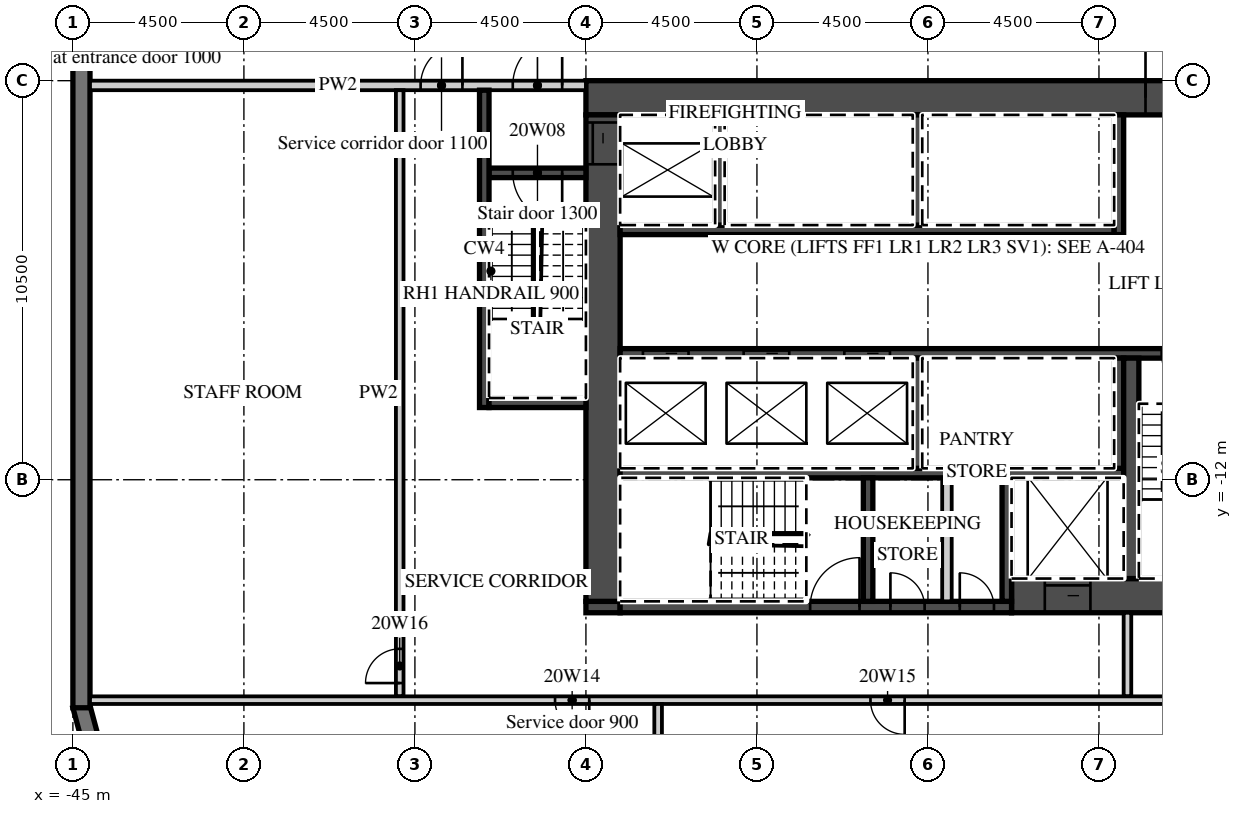
"""IFC4 building model, lengths in metres.
Left out: names, types, materials, properties, quantities, classifications, styles, units other than length and angle.
Written with IfcOpenShell. Run it as: python <this file> out.ifc"""

import sys

from ifc_helpers import new_model, si_unit, direction, frame, frame_2d, origin, place, context, subcontext, project, spatial, polyline, rectangle, outline, extrude, element, fill, save


model = new_model("IFC4")
c1 = context("Model", 3, precision=1e-05, world=origin(), true_north=direction((0.0, 1.0)))
c2 = subcontext(c1, "Body", "Model", "MODEL_VIEW")
j1 = project(units=[si_unit("LENGTHUNIT", "METRE"), si_unit("PLANEANGLEUNIT", "RADIAN")], contexts=[c1])
p1 = place(None, origin())
s1 = spatial("IfcSite", under=j1, at=p1, CompositionType="ELEMENT")
p2 = place(p1, origin())
s2 = spatial("IfcBuilding", under=s1, at=p2, CompositionType="ELEMENT")
p3 = place(p2, frame((0.0, 0.0, 96.3)))
s3 = spatial("IfcBuildingStorey", under=s2, at=p3, CompositionType="ELEMENT", Elevation=96.3)
p4 = place(p3, frame((-44.783, -17.942, 0.0), z_axis=(0.0, 0.0, 1.0), x_axis=(0.25881466832, -0.965926999034, 0.0)))
e1 = element("IfcWall", 1, at=p4, inside=s3, PredefinedType="SOLIDWALL", context=c2, shape_type="SweptSolid", body=[
    extrude(outline(polyline([(0.0, -0.225), (2.071, -0.225), (1.95, 0.225), (0.121, 0.225), (0.0, -0.225)])), origin(), (0.0, 0.0, 1.0), 3.0),
])
p5 = place(p3, frame((-44.775, 18.0, 0.0), z_axis=(0.0, 0.0, 1.0), x_axis=(0.0, -1.0, 0.0)))
e2 = element("IfcWall", 2, at=p5, inside=s3, PredefinedType="SOLIDWALL", context=c2, shape_type="SweptSolid", body=[
    extrude(rectangle(XDim=36.0, YDim=0.45, at=frame_2d((18.0, 0.0))), origin(), (0.0, 0.0, 1.0), 3.0),
])
p6 = place(p5, frame((3.9, 0.0, 0.45)))
e3 = element("IfcOpeningElement", 3, at=p6, cuts=e2, PredefinedType="OPENING", context=c2, shape_type="SweptSolid", body=[
    extrude(rectangle(XDim=3.3, YDim=2.25, at=frame_2d((1.65, 1.125))), frame((0.0, 0.235, 0.0), z_axis=(0.0, -1.0, 0.0), x_axis=(1.0, 0.0, 0.0)), (0.0, 0.0, 1.0), 0.47),
])
p7 = place(p5, frame((8.4, 0.0, 0.45)))
e4 = element("IfcOpeningElement", 4, at=p7, cuts=e2, PredefinedType="OPENING", context=c2, shape_type="SweptSolid", body=[
    extrude(rectangle(XDim=3.3, YDim=2.25, at=frame_2d((1.65, 1.125))), frame((0.0, 0.235, 0.0), z_axis=(0.0, -1.0, 0.0), x_axis=(1.0, 0.0, 0.0)), (0.0, 0.0, 1.0), 0.47),
])
p8 = place(p5, frame((12.9, 0.0, 0.45)))
e5 = element("IfcOpeningElement", 5, at=p8, cuts=e2, PredefinedType="OPENING", context=c2, shape_type="SweptSolid", body=[
    extrude(rectangle(XDim=3.3, YDim=2.25, at=frame_2d((1.65, 1.125))), frame((0.0, 0.235, 0.0), z_axis=(0.0, -1.0, 0.0), x_axis=(1.0, 0.0, 0.0)), (0.0, 0.0, 1.0), 0.47),
])
p9 = place(p3, frame((-31.5, -1.95, 0.0), z_axis=(0.0, 0.0, 1.0), x_axis=(1.0, 0.0, 0.0)))
e6 = element("IfcWall", 6, at=p9, inside=s3, PredefinedType="SHEAR", context=c2, shape_type="SweptSolid", body=[
    extrude(rectangle(XDim=18.0, YDim=0.9, at=frame_2d((9.0, 0.0))), origin(), (0.0, 0.0, 1.0), 3.0),
])
p10 = place(p9, frame((14.725, 0.0, 0.0)))
e7 = element("IfcOpeningElement", 7, at=p10, cuts=e6, PredefinedType="OPENING", context=c2, shape_type="SweptSolid", body=[
    extrude(rectangle(XDim=1.8, YDim=2.1, at=frame_2d((0.9, 1.05))), frame((0.0, 0.46, 0.0), z_axis=(0.0, -1.0, 0.0), x_axis=(1.0, 0.0, 0.0)), (0.0, 0.0, 1.0), 0.92),
])
p11 = place(p3, frame((-20.3, -15.05, 0.0), z_axis=(0.0, 0.0, 1.0), x_axis=(1.0, 0.0, 0.0)))
e8 = element("IfcWall", 8, at=p11, inside=s3, PredefinedType="SHEAR", context=c2, shape_type="SweptSolid", body=[
    extrude(rectangle(XDim=6.8, YDim=0.9, at=frame_2d((3.4, 0.0))), origin(), (0.0, 0.0, 1.0), 3.0),
])
p12 = place(p11, frame((0.875, 0.0, 0.0)))
e9 = element("IfcOpeningElement", 9, at=p12, cuts=e8, PredefinedType="OPENING", context=c2, shape_type="SweptSolid", body=[
    extrude(rectangle(XDim=1.2, YDim=2.1, at=frame_2d((0.6, 1.05))), frame((0.0, 0.46, 0.0), z_axis=(0.0, -1.0, 0.0), x_axis=(1.0, 0.0, 0.0)), (0.0, 0.0, 1.0), 0.92),
])
p13 = place(p3, frame((-31.5, -15.35, 0.0), z_axis=(0.0, 0.0, 1.0), x_axis=(1.0, 0.0, 0.0)))
e10 = element("IfcWall", 10, at=p13, inside=s3, PredefinedType="SHEAR", context=c2, shape_type="SweptSolid", body=[
    extrude(rectangle(XDim=0.9, YDim=0.3, at=frame_2d((0.45, 0.0))), origin(), (0.0, 0.0, 1.0), 3.0),
])
p14 = place(p3, frame((-30.6, -15.35, 0.0), z_axis=(0.0, 0.0, 1.0), x_axis=(1.0, 0.0, 0.0)))
e11 = element("IfcWall", 11, at=p14, inside=s3, PredefinedType="SHEAR", context=c2, shape_type="SweptSolid", body=[
    extrude(rectangle(XDim=10.3, YDim=0.3, at=frame_2d((5.15, 0.0))), origin(), (0.0, 0.0, 1.0), 3.0),
])
p15 = place(p14, frame((5.0, 0.0, 0.0)))
e12 = element("IfcOpeningElement", 12, at=p15, cuts=e11, PredefinedType="OPENING", context=c2, shape_type="SweptSolid", body=[
    extrude(rectangle(XDim=1.3, YDim=2.1, at=frame_2d((0.65, 1.05))), frame((0.0, 0.16, 0.0), z_axis=(0.0, -1.0, 0.0), x_axis=(1.0, 0.0, 0.0)), (0.0, 0.0, 1.0), 0.32),
])
p16 = place(p14, frame((7.113, 0.0, 0.0)))
e13 = element("IfcOpeningElement", 13, at=p16, cuts=e11, PredefinedType="OPENING", context=c2, shape_type="SweptSolid", body=[
    extrude(rectangle(XDim=0.9, YDim=2.1, at=frame_2d((0.45, 1.05))), frame((0.0, 0.16, 0.0), z_axis=(0.0, -1.0, 0.0), x_axis=(1.0, 0.0, 0.0)), (0.0, 0.0, 1.0), 0.32),
])
p17 = place(p14, frame((8.938, 0.0, 0.0)))
e14 = element("IfcOpeningElement", 14, at=p17, cuts=e11, PredefinedType="OPENING", context=c2, shape_type="SweptSolid", body=[
    extrude(rectangle(XDim=0.9, YDim=2.1, at=frame_2d((0.45, 1.05))), frame((0.0, 0.16, 0.0), z_axis=(0.0, -1.0, 0.0), x_axis=(1.0, 0.0, 0.0)), (0.0, 0.0, 1.0), 0.32),
])
p18 = place(p3, frame((-31.05, -15.2, 0.0), z_axis=(0.0, 0.0, 1.0), x_axis=(0.0, 1.0, 0.0)))
e15 = element("IfcWall", 15, at=p18, inside=s3, PredefinedType="SHEAR", context=c2, shape_type="SweptSolid", body=[
    extrude(rectangle(XDim=12.8, YDim=0.9, at=frame_2d((6.4, 0.0))), origin(), (0.0, 0.0, 1.0), 3.0),
])
p19 = place(p18, frame((11.5, 0.0, 0.0)))
e16 = element("IfcOpeningElement", 16, at=p19, cuts=e15, PredefinedType="OPENING", context=c2, shape_type="SweptSolid", body=[
    extrude(rectangle(XDim=1.1, YDim=2.1, at=frame_2d((0.55, 1.05))), frame((0.0, 0.46, 0.0), z_axis=(0.0, -1.0, 0.0), x_axis=(1.0, 0.0, 0.0)), (0.0, 0.0, 1.0), 0.92),
])
p20 = place(p3, frame((-30.6, -5.425, 0.0), z_axis=(0.0, 0.0, 1.0), x_axis=(1.0, 0.0, 0.0)))
e17 = element("IfcWall", 17, at=p20, inside=s3, PredefinedType="SHEAR", context=c2, shape_type="SweptSolid", body=[
    extrude(rectangle(XDim=13.0, YDim=0.25, at=frame_2d((6.5, 0.0))), origin(), (0.0, 0.0, 1.0), 3.0),
])
p21 = place(p3, frame((-17.475, -5.55, 0.0), z_axis=(0.0, 0.0, 1.0), x_axis=(0.0, 1.0, 0.0)))
e18 = element("IfcWall", 18, at=p21, inside=s3, PredefinedType="SHEAR", context=c2, shape_type="SweptSolid", body=[
    extrude(rectangle(XDim=3.15, YDim=0.25, at=frame_2d((1.575, 0.0))), origin(), (0.0, 0.0, 1.0), 3.0),
])
for number, where, z_axis, x_axis in (
    (19, (-27.975, -5.3, 0.0), (0.0, 0.0, 1.0), (0.0, 1.0, 0.0)),
    (20, (-22.775, -5.3, 0.0), (0.0, 0.0, 1.0), (0.0, 1.0, 0.0)),
):
    element("IfcWall", number, at=place(p3, frame(where, z_axis=z_axis, x_axis=x_axis)), inside=s3, PredefinedType="SHEAR", context=c2, shape_type="SweptSolid", body=[
        extrude(rectangle(XDim=2.9, YDim=0.25, at=frame_2d((1.45, 0.0))), origin(), (0.0, 0.0, 1.0), 3.0),
    ])
p22 = place(p3, frame((-30.6, -8.675, 0.0), z_axis=(0.0, 0.0, 1.0), x_axis=(1.0, 0.0, 0.0)))
e21 = element("IfcWall", 21, at=p22, inside=s3, PredefinedType="SHEAR", context=c2, shape_type="SweptSolid", body=[
    extrude(rectangle(XDim=16.2, YDim=0.25, at=frame_2d((8.1, 0.0))), origin(), (0.0, 0.0, 1.0), 3.0),
])
p23 = place(p22, frame((0.6, 0.0, 0.0)))
e22 = element("IfcOpeningElement", 22, at=p23, cuts=e21, PredefinedType="OPENING", context=c2, shape_type="SweptSolid", body=[
    extrude(rectangle(XDim=1.2, YDim=2.1, at=frame_2d((0.6, 1.05))), frame((0.0, 0.135, 0.0), z_axis=(0.0, -1.0, 0.0), x_axis=(1.0, 0.0, 0.0)), (0.0, 0.0, 1.0), 0.27),
])
p24 = place(p22, frame((3.25, 0.0, 0.0)))
e23 = element("IfcOpeningElement", 23, at=p24, cuts=e21, PredefinedType="OPENING", context=c2, shape_type="SweptSolid", body=[
    extrude(rectangle(XDim=1.2, YDim=2.1, at=frame_2d((0.6, 1.05))), frame((0.0, 0.135, 0.0), z_axis=(0.0, -1.0, 0.0), x_axis=(1.0, 0.0, 0.0)), (0.0, 0.0, 1.0), 0.27),
])
p25 = place(p22, frame((5.9, 0.0, 0.0)))
e24 = element("IfcOpeningElement", 24, at=p25, cuts=e21, PredefinedType="OPENING", context=c2, shape_type="SweptSolid", body=[
    extrude(rectangle(XDim=1.2, YDim=2.1, at=frame_2d((0.6, 1.05))), frame((0.0, 0.135, 0.0), z_axis=(0.0, -1.0, 0.0), x_axis=(1.0, 0.0, 0.0)), (0.0, 0.0, 1.0), 0.27),
])
p26 = place(p22, frame((14.25, 0.0, 0.0)))
e25 = element("IfcOpeningElement", 25, at=p26, cuts=e21, PredefinedType="OPENING", context=c2, shape_type="SweptSolid", body=[
    extrude(rectangle(XDim=1.3, YDim=2.1, at=frame_2d((0.65, 1.05))), frame((0.0, 0.135, 0.0), z_axis=(0.0, -1.0, 0.0), x_axis=(1.0, 0.0, 0.0)), (0.0, 0.0, 1.0), 0.27),
])
p27 = place(p3, frame((-30.6, -11.825, 0.0), z_axis=(0.0, 0.0, 1.0), x_axis=(1.0, 0.0, 0.0)))
e26 = element("IfcWall", 26, at=p27, inside=s3, PredefinedType="SHEAR", context=c2, shape_type="SweptSolid", body=[
    extrude(rectangle(XDim=13.25, YDim=0.25, at=frame_2d((6.625, 0.0))), origin(), (0.0, 0.0, 1.0), 3.0),
])
for number, where, z_axis, x_axis in (
    (27, (-17.475, -11.7, 0.0), (0.0, 0.0, 1.0), (0.0, 1.0, 0.0)),
    (28, (-22.775, -11.7, 0.0), (0.0, 0.0, 1.0), (0.0, 1.0, 0.0)),
):
    element("IfcWall", number, at=place(p3, frame(where, z_axis=z_axis, x_axis=x_axis)), inside=s3, PredefinedType="SHEAR", context=c2, shape_type="SweptSolid", body=[
        extrude(rectangle(XDim=2.9, YDim=0.25, at=frame_2d((1.45, 0.0))), origin(), (0.0, 0.0, 1.0), 3.0),
    ])
p28 = place(p3, frame((-17.15, -14.6, 0.0), z_axis=(0.0, 0.0, 1.0), x_axis=(0.0, 1.0, 0.0)))
e29 = element("IfcWall", 29, at=p28, inside=s3, PredefinedType="SHEAR", context=c2, shape_type="SweptSolid", body=[
    extrude(rectangle(XDim=5.8, YDim=0.4, at=frame_2d((2.9, 0.0))), origin(), (0.0, 0.0, 1.0), 3.0),
])
for number, where, z_axis, x_axis in (
    (30, (-20.425, -15.2, 0.0), (0.0, 0.0, 1.0), (0.0, 1.0, 0.0)),
    (31, (-24.075, -15.2, 0.0), (0.0, 0.0, 1.0), (0.0, 1.0, 0.0)),
):
    element("IfcWall", number, at=place(p3, frame(where, z_axis=z_axis, x_axis=x_axis)), inside=s3, PredefinedType="SHEAR", context=c2, shape_type="SweptSolid", body=[
        extrude(rectangle(XDim=3.25, YDim=0.25, at=frame_2d((1.625, 0.0))), origin(), (0.0, 0.0, 1.0), 3.0),
    ])
p29 = place(p3, frame((-22.0, -15.2, 0.0), z_axis=(0.0, 0.0, 1.0), x_axis=(0.0, 1.0, 0.0)))
e32 = element("IfcWall", 32, at=p29, inside=s3, PredefinedType="PARTITIONING", context=c2, shape_type="SweptSolid", body=[
    extrude(rectangle(XDim=3.25, YDim=0.25, at=frame_2d((1.625, 0.0))), origin(), (0.0, 0.0, 1.0), 3.0),
])
p30 = place(p3, frame((-44.55, -1.625, 0.0), z_axis=(0.0, 0.0, 1.0), x_axis=(1.0, 0.0, 0.0)))
e33 = element("IfcWall", 33, at=p30, inside=s3, PredefinedType="PARTITIONING", context=c2, shape_type="SweptSolid", body=[
    extrude(rectangle(XDim=13.05, YDim=0.25, at=frame_2d((6.525, 0.0))), origin(), (0.0, 0.0, 1.0), 3.0),
])
p31 = place(p30, frame((11.125, 0.0, 0.0)))
e34 = element("IfcOpeningElement", 34, at=p31, cuts=e33, PredefinedType="OPENING", context=c2, shape_type="SweptSolid", body=[
    extrude(rectangle(XDim=1.3, YDim=2.1, at=frame_2d((0.65, 1.05))), frame((0.0, 0.135, 0.0), z_axis=(0.0, -1.0, 0.0), x_axis=(1.0, 0.0, 0.0)), (0.0, 0.0, 1.0), 0.27),
])
p32 = place(p30, frame((8.7, 0.0, 0.0)))
e35 = element("IfcOpeningElement", 35, at=p32, cuts=e33, PredefinedType="OPENING", context=c2, shape_type="SweptSolid", body=[
    extrude(rectangle(XDim=1.1, YDim=2.1, at=frame_2d((0.55, 1.05))), frame((0.0, 0.135, 0.0), z_axis=(0.0, -1.0, 0.0), x_axis=(1.0, 0.0, 0.0)), (0.0, 0.0, 1.0), 0.27),
])
p33 = place(p3, frame((-34.05, -3.925, 0.0), z_axis=(0.0, 0.0, 1.0), x_axis=(1.0, 0.0, 0.0)))
e36 = element("IfcWall", 36, at=p33, inside=s3, PredefinedType="SHEAR", context=c2, shape_type="SweptSolid", body=[
    extrude(rectangle(XDim=2.55, YDim=0.25, at=frame_2d((1.275, 0.0))), origin(), (0.0, 0.0, 1.0), 3.0),
])
p34 = place(p33, frame((0.625, 0.0, 0.0)))
e37 = element("IfcOpeningElement", 37, at=p34, cuts=e36, PredefinedType="OPENING", context=c2, shape_type="SweptSolid", body=[
    extrude(rectangle(XDim=1.3, YDim=2.1, at=frame_2d((0.65, 1.05))), frame((0.0, 0.135, 0.0), z_axis=(0.0, -1.0, 0.0), x_axis=(1.0, 0.0, 0.0)), (0.0, 0.0, 1.0), 0.27),
])
p35 = place(p3, frame((-34.175, -10.1, 0.0), z_axis=(0.0, 0.0, 1.0), x_axis=(0.0, 1.0, 0.0)))
e38 = element("IfcWall", 38, at=p35, inside=s3, PredefinedType="SHEAR", context=c2, shape_type="SweptSolid", body=[
    extrude(rectangle(XDim=8.35, YDim=0.25, at=frame_2d((4.175, 0.0))), origin(), (0.0, 0.0, 1.0), 3.0),
])
p36 = place(p3, frame((-34.05, -9.975, 0.0), z_axis=(0.0, 0.0, 1.0), x_axis=(1.0, 0.0, 0.0)))
e39 = element("IfcWall", 39, at=p36, inside=s3, PredefinedType="SHEAR", context=c2, shape_type="SweptSolid", body=[
    extrude(rectangle(XDim=2.55, YDim=0.25, at=frame_2d((1.275, 0.0))), origin(), (0.0, 0.0, 1.0), 3.0),
])
p37 = place(p3, frame((-17.25, -17.7, 0.0), z_axis=(0.0, 0.0, 1.0), x_axis=(0.0, 1.0, 0.0)))
e40 = element("IfcWall", 40, at=p37, inside=s3, PredefinedType="PARTITIONING", context=c2, shape_type="SweptSolid", body=[
    extrude(rectangle(XDim=2.2, YDim=0.2, at=frame_2d((1.1, 0.0))), origin(), (0.0, 0.0, 1.0), 3.0),
])
p38 = place(p3, frame((-36.4, -17.7, 0.0), z_axis=(0.0, 0.0, 1.0), x_axis=(0.0, 1.0, 0.0)))
e41 = element("IfcWall", 41, at=p38, inside=s3, PredefinedType="PARTITIONING", context=c2, shape_type="SweptSolid", body=[
    extrude(rectangle(XDim=15.95, YDim=0.2, at=frame_2d((7.975, 0.0))), origin(), (0.0, 0.0, 1.0), 3.0),
])
p39 = place(p38, frame((0.35, 0.0, 0.0)))
e42 = element("IfcOpeningElement", 42, at=p39, cuts=e41, PredefinedType="OPENING", context=c2, shape_type="SweptSolid", body=[
    extrude(rectangle(XDim=0.9, YDim=2.1, at=frame_2d((0.45, 1.05))), frame((0.0, 0.11, 0.0), z_axis=(0.0, -1.0, 0.0), x_axis=(1.0, 0.0, 0.0)), (0.0, 0.0, 1.0), 0.22),
])
p40 = place(p3, frame((-44.55, -17.8, 0.0), z_axis=(0.0, 0.0, 1.0), x_axis=(1.0, 0.0, 0.0)))
e43 = element("IfcWall", 43, at=p40, inside=s3, PredefinedType="PARTITIONING", context=c2, shape_type="SweptSolid", body=[
    extrude(rectangle(XDim=30.95, YDim=0.2, at=frame_2d((15.475, 0.0))), origin(), (0.0, 0.0, 1.0), 3.0),
])
p41 = place(p40, frame((12.238, 0.0, 0.0)))
e44 = element("IfcOpeningElement", 44, at=p41, cuts=e43, PredefinedType="OPENING", context=c2, shape_type="SweptSolid", body=[
    extrude(rectangle(XDim=0.9, YDim=2.1, at=frame_2d((0.45, 1.05))), frame((0.0, 0.11, 0.0), z_axis=(0.0, -1.0, 0.0), x_axis=(1.0, 0.0, 0.0)), (0.0, 0.0, 1.0), 0.22),
])
p42 = place(p40, frame((20.538, 0.0, 0.0)))
e45 = element("IfcOpeningElement", 45, at=p42, cuts=e43, PredefinedType="OPENING", context=c2, shape_type="SweptSolid", body=[
    extrude(rectangle(XDim=0.9, YDim=2.1, at=frame_2d((0.45, 1.05))), frame((0.0, 0.11, 0.0), z_axis=(0.0, -1.0, 0.0), x_axis=(1.0, 0.0, 0.0)), (0.0, 0.0, 1.0), 0.22),
])
p43 = place(p3, frame((-29.6, -21.55, 0.0), z_axis=(0.0, 0.0, 1.0), x_axis=(0.0, 1.0, 0.0)))
e46 = element("IfcWall", 46, at=p43, inside=s3, PredefinedType="PARTITIONING", context=c2, shape_type="SweptSolid", body=[
    extrude(rectangle(XDim=3.65, YDim=0.2, at=frame_2d((1.825, 0.0))), origin(), (0.0, 0.0, 1.0), 3.0),
])
p44 = place(p23, origin())
e47 = element("IfcDoor", 47, at=p44, inside=s3, OperationType="SLIDING_TO_LEFT", PredefinedType="DOOR", context=c2, shape_type="SweptSolid", body=[
    extrude(rectangle(XDim=1.2, YDim=2.1, at=frame_2d((0.6, 1.05))), frame((0.0, 0.025, 0.0), z_axis=(0.0, -1.0, 0.0), x_axis=(1.0, 0.0, 0.0)), (0.0, 0.0, 1.0), 0.05),
])
fill(e22, e47)
p45 = place(p24, origin())
e48 = element("IfcDoor", 48, at=p45, inside=s3, OperationType="SLIDING_TO_RIGHT", PredefinedType="DOOR", context=c2, shape_type="SweptSolid", body=[
    extrude(rectangle(XDim=1.2, YDim=2.1, at=frame_2d((0.6, 1.05))), frame((0.0, 0.025, 0.0), z_axis=(0.0, -1.0, 0.0), x_axis=(1.0, 0.0, 0.0)), (0.0, 0.0, 1.0), 0.05),
])
fill(e23, e48)
p46 = place(p25, origin())
e49 = element("IfcDoor", 49, at=p46, inside=s3, OperationType="SLIDING_TO_RIGHT", PredefinedType="DOOR", context=c2, shape_type="SweptSolid", body=[
    extrude(rectangle(XDim=1.2, YDim=2.1, at=frame_2d((0.6, 1.05))), frame((0.0, 0.025, 0.0), z_axis=(0.0, -1.0, 0.0), x_axis=(1.0, 0.0, 0.0)), (0.0, 0.0, 1.0), 0.05),
])
fill(e24, e49)
p47 = place(p12, origin())
e50 = element("IfcDoor", 50, at=p47, inside=s3, OperationType="SLIDING_TO_LEFT", PredefinedType="DOOR", context=c2, shape_type="SweptSolid", body=[
    extrude(rectangle(XDim=1.2, YDim=2.1, at=frame_2d((0.6, 1.05))), frame((0.0, 0.025, 0.0), z_axis=(0.0, -1.0, 0.0), x_axis=(1.0, 0.0, 0.0)), (0.0, 0.0, 1.0), 0.05),
])
fill(e9, e50)
p48 = place(p19, origin())
e51 = element("IfcDoor", 51, at=p48, inside=s3, OperationType="SLIDING_TO_RIGHT", PredefinedType="DOOR", context=c2, shape_type="SweptSolid", body=[
    extrude(rectangle(XDim=1.1, YDim=2.1, at=frame_2d((0.55, 1.05))), frame((0.0, 0.025, 0.0), z_axis=(0.0, -1.0, 0.0), x_axis=(1.0, 0.0, 0.0)), (0.0, 0.0, 1.0), 0.05),
])
fill(e16, e51)
p49 = place(p10, origin())
e52 = element("IfcDoor", 52, at=p49, inside=s3, OperationType="DOUBLE_DOOR_DOUBLE_SWING", PredefinedType="DOOR", context=c2, shape_type="SweptSolid", body=[
    extrude(rectangle(XDim=1.8, YDim=2.1, at=frame_2d((0.9, 1.05))), frame((0.0, 0.025, 0.0), z_axis=(0.0, -1.0, 0.0), x_axis=(1.0, 0.0, 0.0)), (0.0, 0.0, 1.0), 0.05),
])
fill(e7, e52)
p50 = place(p31, origin())
e53 = element("IfcDoor", 53, at=p50, inside=s3, OperationType="SINGLE_SWING_RIGHT", PredefinedType="DOOR", context=c2, shape_type="SweptSolid", body=[
    extrude(rectangle(XDim=1.3, YDim=2.1, at=frame_2d((0.65, 1.05))), frame((0.0, 0.025, 0.0), z_axis=(0.0, -1.0, 0.0), x_axis=(1.0, 0.0, 0.0)), (0.0, 0.0, 1.0), 0.05),
])
fill(e34, e53)
p51 = place(p34, origin())
e54 = element("IfcDoor", 54, at=p51, inside=s3, OperationType="SINGLE_SWING_RIGHT", PredefinedType="DOOR", context=c2, shape_type="SweptSolid", body=[
    extrude(rectangle(XDim=1.3, YDim=2.1, at=frame_2d((0.65, 1.05))), frame((0.0, 0.025, 0.0), z_axis=(0.0, -1.0, 0.0), x_axis=(1.0, 0.0, 0.0)), (0.0, 0.0, 1.0), 0.05),
])
fill(e37, e54)
p52 = place(p32, origin())
e55 = element("IfcDoor", 55, at=p52, inside=s3, OperationType="SINGLE_SWING_RIGHT", PredefinedType="DOOR", context=c2, shape_type="SweptSolid", body=[
    extrude(rectangle(XDim=1.1, YDim=2.1, at=frame_2d((0.55, 1.05))), frame((0.0, 0.025, 0.0), z_axis=(0.0, -1.0, 0.0), x_axis=(1.0, 0.0, 0.0)), (0.0, 0.0, 1.0), 0.05),
])
fill(e35, e55)
p53 = place(p26, origin())
e56 = element("IfcDoor", 56, at=p53, inside=s3, OperationType="SINGLE_SWING_RIGHT", PredefinedType="DOOR", context=c2, shape_type="SweptSolid", body=[
    extrude(rectangle(XDim=1.3, YDim=2.1, at=frame_2d((0.65, 1.05))), frame((0.0, 0.025, 0.0), z_axis=(0.0, -1.0, 0.0), x_axis=(1.0, 0.0, 0.0)), (0.0, 0.0, 1.0), 0.05),
])
fill(e25, e56)
p54 = place(p15, origin())
e57 = element("IfcDoor", 57, at=p54, inside=s3, OperationType="SINGLE_SWING_RIGHT", PredefinedType="DOOR", context=c2, shape_type="SweptSolid", body=[
    extrude(rectangle(XDim=1.3, YDim=2.1, at=frame_2d((0.65, 1.05))), frame((0.0, 0.025, 0.0), z_axis=(0.0, -1.0, 0.0), x_axis=(1.0, 0.0, 0.0)), (0.0, 0.0, 1.0), 0.05),
])
fill(e12, e57)
p55 = place(p16, origin())
e58 = element("IfcDoor", 58, at=p55, inside=s3, OperationType="SINGLE_SWING_LEFT", PredefinedType="DOOR", context=c2, shape_type="SweptSolid", body=[
    extrude(rectangle(XDim=0.9, YDim=2.1, at=frame_2d((0.45, 1.05))), frame((0.0, 0.025, 0.0), z_axis=(0.0, -1.0, 0.0), x_axis=(1.0, 0.0, 0.0)), (0.0, 0.0, 1.0), 0.05),
])
fill(e13, e58)
p56 = place(p17, origin())
e59 = element("IfcDoor", 59, at=p56, inside=s3, OperationType="SINGLE_SWING_LEFT", PredefinedType="DOOR", context=c2, shape_type="SweptSolid", body=[
    extrude(rectangle(XDim=0.9, YDim=2.1, at=frame_2d((0.45, 1.05))), frame((0.0, 0.025, 0.0), z_axis=(0.0, -1.0, 0.0), x_axis=(1.0, 0.0, 0.0)), (0.0, 0.0, 1.0), 0.05),
])
fill(e14, e59)
p57 = place(p41, origin())
e60 = element("IfcDoor", 60, at=p57, inside=s3, OperationType="SINGLE_SWING_RIGHT", PredefinedType="DOOR", context=c2, shape_type="SweptSolid", body=[
    extrude(rectangle(XDim=0.9, YDim=2.1, at=frame_2d((0.45, 1.05))), frame((0.0, 0.025, 0.0), z_axis=(0.0, -1.0, 0.0), x_axis=(1.0, 0.0, 0.0)), (0.0, 0.0, 1.0), 0.05),
])
fill(e44, e60)
p58 = place(p42, origin())
e61 = element("IfcDoor", 61, at=p58, inside=s3, OperationType="SINGLE_SWING_RIGHT", PredefinedType="DOOR", context=c2, shape_type="SweptSolid", body=[
    extrude(rectangle(XDim=0.9, YDim=2.1, at=frame_2d((0.45, 1.05))), frame((0.0, 0.025, 0.0), z_axis=(0.0, -1.0, 0.0), x_axis=(1.0, 0.0, 0.0)), (0.0, 0.0, 1.0), 0.05),
])
fill(e45, e61)
p59 = place(p39, origin())
e62 = element("IfcDoor", 62, at=p59, inside=s3, OperationType="SINGLE_SWING_LEFT", PredefinedType="DOOR", context=c2, shape_type="SweptSolid", body=[
    extrude(rectangle(XDim=0.9, YDim=2.1, at=frame_2d((0.45, 1.05))), frame((0.0, 0.025, 0.0), z_axis=(0.0, -1.0, 0.0), x_axis=(1.0, 0.0, 0.0)), (0.0, 0.0, 1.0), 0.05),
])
fill(e42, e62)
save(model, sys.argv[1])
